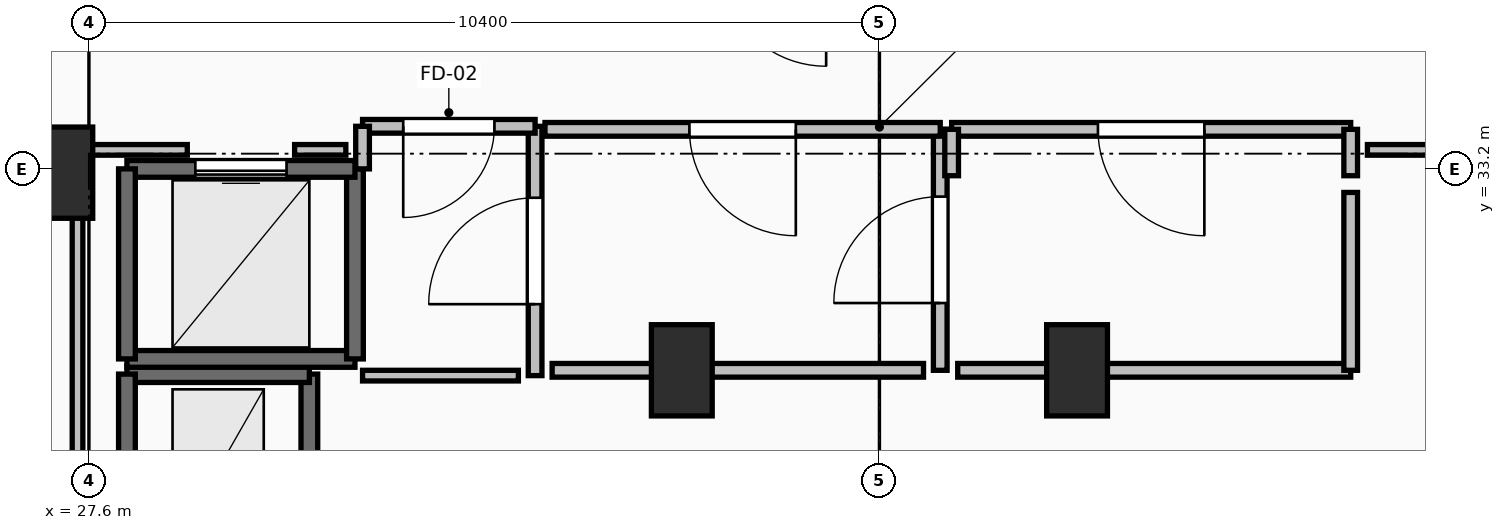
"""IFC4 building model, lengths in metres.
Left out: names, types, materials, properties, quantities, classifications, styles, units other than length and angle.
Written with IfcOpenShell. Run it as: python <this file> out.ifc"""

import sys

from ifc_helpers import new_model, si_unit, direction, frame, frame_2d, origin, origin_2d, place, context, subcontext, project, spatial, rectangle, extrude, element, fill, save


model = new_model("IFC4")
c1 = context("Model", 3, precision=1e-05, world=origin(), true_north=direction((0.0, 1.0)))
c2 = subcontext(c1, "Body", "Model", "MODEL_VIEW")
j1 = project(units=[si_unit("LENGTHUNIT", "METRE"), si_unit("PLANEANGLEUNIT", "RADIAN")], contexts=[c1])
p1 = place(None, origin())
s1 = spatial("IfcSite", under=j1, at=p1, CompositionType="ELEMENT")
p2 = place(p1, origin())
s2 = spatial("IfcBuilding", under=s1, at=p2, CompositionType="ELEMENT")
p3 = place(p2, frame((0.0, 0.0, -9.6)))
s3 = spatial("IfcBuildingStorey", under=s2, at=p3, CompositionType="ELEMENT", Elevation=-9.6)
for number, where, z_axis, x_axis in (
    (1, (27.25, 33.15, 0.0), (0.0, 0.0, 1.0), (1.0, 0.0, 0.0)),
    (2, (35.4, 30.55, 0.0), (0.0, 0.0, 1.0), (1.0, 0.0, 0.0)),
    (3, (40.6, 30.55, 0.0), (0.0, 0.0, 1.0), (1.0, 0.0, 0.0)),
):
    element("IfcColumn", number, at=place(p3, frame(where, z_axis=z_axis, x_axis=x_axis)), inside=s3, PredefinedType="PILASTER", context=c2, shape_type="SweptSolid", body=[
        extrude(rectangle(XDim=0.8, YDim=1.2, at=origin_2d()), origin(), (0.0, 0.0, 1.0), 4.8),
    ])
p4 = place(p3, frame((30.5, 28.0, 0.0), z_axis=(0.0, 0.0, 1.0), x_axis=(0.0, 1.0, 0.0)))
e4 = element("IfcWall", 4, at=p4, inside=s3, PredefinedType="SHEAR", context=c2, shape_type="SweptSolid", body=[
    extrude(rectangle(XDim=2.5, YDim=0.22, at=frame_2d((1.25, 0.0))), origin(), (0.0, 0.0, 1.0), 4.45),
])
p5 = place(p3, frame((30.5, 30.5, 0.0), z_axis=(0.0, 0.0, 1.0), x_axis=(-1.0, 0.0, 0.0)))
e5 = element("IfcWall", 5, at=p5, inside=s3, PredefinedType="SHEAR", context=c2, shape_type="SweptSolid", body=[
    extrude(rectangle(XDim=2.4, YDim=0.22, at=frame_2d((1.2, 0.0))), origin(), (0.0, 0.0, 1.0), 4.45),
])
p6 = place(p3, frame((28.1, 30.5, 0.0), z_axis=(0.0, 0.0, 1.0), x_axis=(0.0, -1.0, 0.0)))
e6 = element("IfcWall", 6, at=p6, inside=s3, PredefinedType="SHEAR", context=c2, shape_type="SweptSolid", body=[
    extrude(rectangle(XDim=2.5, YDim=0.22, at=frame_2d((1.25, 0.0))), origin(), (0.0, 0.0, 1.0), 4.45),
])
p7 = place(p3, frame((28.1, 30.7, 0.0), z_axis=(0.0, 0.0, 1.0), x_axis=(1.0, 0.0, 0.0)))
e7 = element("IfcWall", 7, at=p7, inside=s3, PredefinedType="SOLIDWALL", context=c2, shape_type="SweptSolid", body=[
    extrude(rectangle(XDim=3.0, YDim=0.22, at=frame_2d((1.5, 0.0))), origin(), (0.0, 0.0, 1.0), 4.45),
])
p8 = place(p3, frame((31.1, 30.7, 0.0), z_axis=(0.0, 0.0, 1.0), x_axis=(0.0, 1.0, 0.0)))
e8 = element("IfcWall", 8, at=p8, inside=s3, PredefinedType="SOLIDWALL", context=c2, shape_type="SweptSolid", body=[
    extrude(rectangle(XDim=2.5, YDim=0.22, at=frame_2d((1.25, 0.0))), origin(), (0.0, 0.0, 1.0), 4.45),
])
p9 = place(p3, frame((31.1, 33.2, 0.0), z_axis=(0.0, 0.0, 1.0), x_axis=(-1.0, 0.0, 0.0)))
e9 = element("IfcWall", 9, at=p9, inside=s3, PredefinedType="SOLIDWALL", context=c2, shape_type="SweptSolid", body=[
    extrude(rectangle(XDim=3.0, YDim=0.22, at=frame_2d((1.5, 0.0))), origin(), (0.0, 0.0, 1.0), 4.45),
])
p10 = place(p9, frame((0.9, 0.0, 0.0)))
e10 = element("IfcOpeningElement", 10, at=p10, cuts=e9, PredefinedType="OPENING", context=c2, shape_type="SweptSolid", body=[
    extrude(rectangle(XDim=1.2, YDim=2.2, at=frame_2d((0.6, 1.1))), frame((0.0, 0.125, 0.0), z_axis=(0.0, -1.0, 0.0), x_axis=(1.0, 0.0, 0.0)), (0.0, 0.0, 1.0), 0.25),
])
p11 = place(p3, frame((28.1, 33.2, 0.0), z_axis=(0.0, 0.0, 1.0), x_axis=(0.0, -1.0, 0.0)))
e11 = element("IfcWall", 11, at=p11, inside=s3, PredefinedType="SOLIDWALL", context=c2, shape_type="SweptSolid", body=[
    extrude(rectangle(XDim=2.5, YDim=0.22, at=frame_2d((1.25, 0.0))), origin(), (0.0, 0.0, 1.0), 4.45),
])
p12 = place(p3, frame((33.47, 30.48, 0.0), z_axis=(0.0, 0.0, 1.0), x_axis=(0.0, 1.0, 0.0)))
e12 = element("IfcWall", 12, at=p12, inside=s3, PredefinedType="PARTITIONING", context=c2, shape_type="SweptSolid", body=[
    extrude(rectangle(XDim=3.28, YDim=0.18, at=frame_2d((1.64, 0.0))), origin(), (0.0, 0.0, 1.0), 4.45),
])
p13 = place(p12, frame((0.94, 0.0, 0.0)))
e13 = element("IfcOpeningElement", 13, at=p13, cuts=e12, PredefinedType="OPENING", context=c2, shape_type="SweptSolid", body=[
    extrude(rectangle(XDim=1.4, YDim=2.2, at=frame_2d((0.7, 1.1))), frame((0.0, 0.105, 0.0), z_axis=(0.0, -1.0, 0.0), x_axis=(1.0, 0.0, 0.0)), (0.0, 0.0, 1.0), 0.21),
])
p14 = place(p3, frame((33.47, 33.76, 0.0), z_axis=(0.0, 0.0, 1.0), x_axis=(-1.0, 0.0, 0.0)))
e14 = element("IfcWall", 14, at=p14, inside=s3, PredefinedType="PARTITIONING", context=c2, shape_type="SweptSolid", body=[
    extrude(rectangle(XDim=2.27, YDim=0.18, at=frame_2d((1.135, 0.0))), origin(), (0.0, 0.0, 1.0), 4.45),
])
p15 = place(p14, frame((0.535, 0.0, 0.0)))
e15 = element("IfcOpeningElement", 15, at=p15, cuts=e14, PredefinedType="OPENING", context=c2, shape_type="SweptSolid", body=[
    extrude(rectangle(XDim=1.2, YDim=2.15, at=frame_2d((0.6, 1.075))), frame((0.0, 0.105, 0.0), z_axis=(0.0, -1.0, 0.0), x_axis=(1.0, 0.0, 0.0)), (0.0, 0.0, 1.0), 0.21),
])
p16 = place(p3, frame((31.2, 33.76, 0.0), z_axis=(0.0, 0.0, 1.0), x_axis=(0.0, -1.0, 0.0)))
e16 = element("IfcWall", 16, at=p16, inside=s3, PredefinedType="PARTITIONING", context=c2, shape_type="SweptSolid", body=[
    extrude(rectangle(XDim=0.56, YDim=0.18, at=frame_2d((0.28, 0.0))), origin(), (0.0, 0.0, 1.0), 4.45),
])
p17 = place(p3, frame((38.8, 30.55, 0.0), z_axis=(0.0, 0.0, 1.0), x_axis=(0.0, 1.0, 0.0)))
e17 = element("IfcWall", 17, at=p17, inside=s3, PredefinedType="PARTITIONING", context=c2, shape_type="SweptSolid", body=[
    extrude(rectangle(XDim=3.17, YDim=0.18, at=frame_2d((1.585, 0.0))), origin(), (0.0, 0.0, 1.0), 3.03),
])
p18 = place(p17, frame((0.885, 0.0, 0.0)))
e18 = element("IfcOpeningElement", 18, at=p18, cuts=e17, PredefinedType="OPENING", context=c2, shape_type="SweptSolid", body=[
    extrude(rectangle(XDim=1.4, YDim=2.2, at=frame_2d((0.7, 1.1))), frame((0.0, 0.105, 0.0), z_axis=(0.0, -1.0, 0.0), x_axis=(1.0, 0.0, 0.0)), (0.0, 0.0, 1.0), 0.21),
])
p19 = place(p3, frame((38.8, 33.72, 0.0), z_axis=(0.0, 0.0, 1.0), x_axis=(-1.0, 0.0, 0.0)))
e19 = element("IfcWall", 19, at=p19, inside=s3, PredefinedType="PARTITIONING", context=c2, shape_type="SweptSolid", body=[
    extrude(rectangle(XDim=5.2, YDim=0.18, at=frame_2d((2.6, 0.0))), origin(), (0.0, 0.0, 1.0), 4.45),
])
p20 = place(p19, frame((1.9, 0.0, 0.0)))
e20 = element("IfcOpeningElement", 20, at=p20, cuts=e19, PredefinedType="OPENING", context=c2, shape_type="SweptSolid", body=[
    extrude(rectangle(XDim=1.4, YDim=2.2, at=frame_2d((0.7, 1.1))), frame((0.0, 0.105, 0.0), z_axis=(0.0, -1.0, 0.0), x_axis=(1.0, 0.0, 0.0)), (0.0, 0.0, 1.0), 0.21),
])
p21 = place(p3, frame((44.2, 33.72, 0.0), z_axis=(0.0, 0.0, 1.0), x_axis=(-1.0, 0.0, 0.0)))
e21 = element("IfcWall", 21, at=p21, inside=s3, PredefinedType="PARTITIONING", context=c2, shape_type="SweptSolid", body=[
    extrude(rectangle(XDim=5.25, YDim=0.18, at=frame_2d((2.625, 0.0))), origin(), (0.0, 0.0, 1.0), 4.45),
])
p22 = place(p21, frame((1.925, 0.0, 0.0)))
e22 = element("IfcOpeningElement", 22, at=p22, cuts=e21, PredefinedType="OPENING", context=c2, shape_type="SweptSolid", body=[
    extrude(rectangle(XDim=1.4, YDim=2.2, at=frame_2d((0.7, 1.1))), frame((0.0, 0.105, 0.0), z_axis=(0.0, -1.0, 0.0), x_axis=(1.0, 0.0, 0.0)), (0.0, 0.0, 1.0), 0.21),
])
for number, where, z_axis, x_axis in (
    (23, (38.95, 33.72, 0.0), (0.0, 0.0, 1.0), (0.0, -1.0, 0.0)),
    (24, (44.2, 33.11, 0.0), (0.0, 0.0, 1.0), (0.0, 1.0, 0.0)),
):
    element("IfcWall", number, at=place(p3, frame(where, z_axis=z_axis, x_axis=x_axis)), inside=s3, PredefinedType="PARTITIONING", context=c2, shape_type="SweptSolid", body=[
        extrude(rectangle(XDim=0.61, YDim=0.18, at=frame_2d((0.305, 0.0))), origin(), (0.0, 0.0, 1.0), 4.45),
    ])
p23 = place(p3, frame((31.2, 30.48, 0.0), z_axis=(0.0, 0.0, 1.0), x_axis=(1.0, 0.0, 0.0)))
e25 = element("IfcWall", 25, at=p23, inside=s3, PredefinedType="PARTITIONING", context=c2, shape_type="SweptSolid", body=[
    extrude(rectangle(XDim=2.05, YDim=0.14, at=frame_2d((1.025, 0.0))), origin(), (0.0, 0.0, 1.0), 4.45),
])
p24 = place(p3, frame((33.694, 30.55, 0.0), z_axis=(0.0, 0.0, 1.0), x_axis=(1.0, 0.0, 0.0)))
e26 = element("IfcWall", 26, at=p24, inside=s3, PredefinedType="PARTITIONING", context=c2, shape_type="SweptSolid", body=[
    extrude(rectangle(XDim=4.886, YDim=0.18, at=frame_2d((2.443, 0.0))), origin(), (0.0, 0.0, 1.0), 3.03),
])
p25 = place(p3, frame((39.03, 30.55, 0.0), z_axis=(0.0, 0.0, 1.0), x_axis=(1.0, 0.0, 0.0)))
e27 = element("IfcWall", 27, at=p25, inside=s3, PredefinedType="PARTITIONING", context=c2, shape_type="SweptSolid", body=[
    extrude(rectangle(XDim=5.17, YDim=0.18, at=frame_2d((2.585, 0.0))), origin(), (0.0, 0.0, 1.0), 3.03),
])
p26 = place(p3, frame((44.2, 30.55, 0.0), z_axis=(0.0, 0.0, 1.0), x_axis=(0.0, 1.0, 0.0)))
e28 = element("IfcWall", 28, at=p26, inside=s3, PredefinedType="PARTITIONING", context=c2, shape_type="SweptSolid", body=[
    extrude(rectangle(XDim=2.34, YDim=0.18, at=frame_2d((1.17, 0.0))), origin(), (0.0, 0.0, 1.0), 4.45),
])
p27 = place(p3, frame((44.42, 33.45, 0.0), z_axis=(0.0, 0.0, 1.0), x_axis=(1.0, 0.0, 0.0)))
e29 = element("IfcWall", 29, at=p27, inside=s3, PredefinedType="PARTITIONING", context=c2, shape_type="SweptSolid", body=[
    extrude(rectangle(XDim=4.13, YDim=0.14, at=frame_2d((2.065, 0.0))), origin(), (0.0, 0.0, 1.0), 3.642),
])
p28 = place(p3, frame((27.45, 28.196, 0.0), z_axis=(0.0, 0.0, 1.0), x_axis=(0.0, 1.0, 0.0)))
e30 = element("IfcWall", 30, at=p28, inside=s3, PredefinedType="PARTITIONING", context=c2, shape_type="SweptSolid", body=[
    extrude(rectangle(XDim=5.254, YDim=0.14, at=frame_2d((2.627, 0.0))), origin(), (0.0, 0.0, 1.0), 3.03),
])
p29 = place(p3, frame((27.45, 33.45, 0.0), z_axis=(0.0, 0.0, 1.0), x_axis=(1.0, 0.0, 0.0)))
e31 = element("IfcWall", 31, at=p29, inside=s3, PredefinedType="PARTITIONING", context=c2, shape_type="SweptSolid", body=[
    extrude(rectangle(XDim=1.444, YDim=0.14, at=frame_2d((0.722, 0.0))), origin(), (0.0, 0.0, 1.0), 3.642),
])
p30 = place(p3, frame((30.306, 33.45, 0.0), z_axis=(0.0, 0.0, 1.0), x_axis=(1.0, 0.0, 0.0)))
e32 = element("IfcWall", 32, at=p30, inside=s3, PredefinedType="PARTITIONING", context=c2, shape_type="SweptSolid", body=[
    extrude(rectangle(XDim=0.674, YDim=0.14, at=frame_2d((0.337, 0.0))), origin(), (0.0, 0.0, 1.0), 4.45),
])
p31 = place(p10, origin())
e33 = element("IfcDoor", 33, at=p31, inside=s3, OperationType="SLIDING_TO_LEFT", PredefinedType="DOOR", context=c2, shape_type="SweptSolid", body=[
    extrude(rectangle(XDim=1.2, YDim=2.2, at=frame_2d((0.6, 1.1))), frame((0.0, 0.025, 0.0), z_axis=(0.0, -1.0, 0.0), x_axis=(1.0, 0.0, 0.0)), (0.0, 0.0, 1.0), 0.05),
])
fill(e10, e33)
p32 = place(p13, origin())
e34 = element("IfcDoor", 34, at=p32, inside=s3, OperationType="DOUBLE_SWING_LEFT", PredefinedType="DOOR", context=c2, shape_type="SweptSolid", body=[
    extrude(rectangle(XDim=1.4, YDim=2.2, at=frame_2d((0.7, 1.1))), frame((0.0, 0.025, 0.0), z_axis=(0.0, -1.0, 0.0), x_axis=(1.0, 0.0, 0.0)), (0.0, 0.0, 1.0), 0.05),
])
fill(e13, e34)
p33 = place(p15, origin())
e35 = element("IfcDoor", 35, at=p33, inside=s3, OperationType="SINGLE_SWING_RIGHT", PredefinedType="DOOR", context=c2, shape_type="SweptSolid", body=[
    extrude(rectangle(XDim=1.2, YDim=2.15, at=frame_2d((0.6, 1.075))), frame((0.0, 0.025, 0.0), z_axis=(0.0, -1.0, 0.0), x_axis=(1.0, 0.0, 0.0)), (0.0, 0.0, 1.0), 0.05),
])
fill(e15, e35)
p34 = place(p18, origin())
e36 = element("IfcDoor", 36, at=p34, inside=s3, OperationType="DOUBLE_SWING_LEFT", PredefinedType="DOOR", context=c2, shape_type="SweptSolid", body=[
    extrude(rectangle(XDim=1.4, YDim=2.2, at=frame_2d((0.7, 1.1))), frame((0.0, 0.025, 0.0), z_axis=(0.0, -1.0, 0.0), x_axis=(1.0, 0.0, 0.0)), (0.0, 0.0, 1.0), 0.05),
])
fill(e18, e36)
p35 = place(p20, origin())
e37 = element("IfcDoor", 37, at=p35, inside=s3, OperationType="DOUBLE_SWING_LEFT", PredefinedType="DOOR", context=c2, shape_type="SweptSolid", body=[
    extrude(rectangle(XDim=1.4, YDim=2.2, at=frame_2d((0.7, 1.1))), frame((0.0, 0.025, 0.0), z_axis=(0.0, -1.0, 0.0), x_axis=(1.0, 0.0, 0.0)), (0.0, 0.0, 1.0), 0.05),
])
fill(e20, e37)
p36 = place(p22, origin())
e38 = element("IfcDoor", 38, at=p36, inside=s3, OperationType="DOUBLE_SWING_LEFT", PredefinedType="DOOR", context=c2, shape_type="SweptSolid", body=[
    extrude(rectangle(XDim=1.4, YDim=2.2, at=frame_2d((0.7, 1.1))), frame((0.0, 0.025, 0.0), z_axis=(0.0, -1.0, 0.0), x_axis=(1.0, 0.0, 0.0)), (0.0, 0.0, 1.0), 0.05),
])
fill(e22, e38)
save(model, sys.argv[1])
